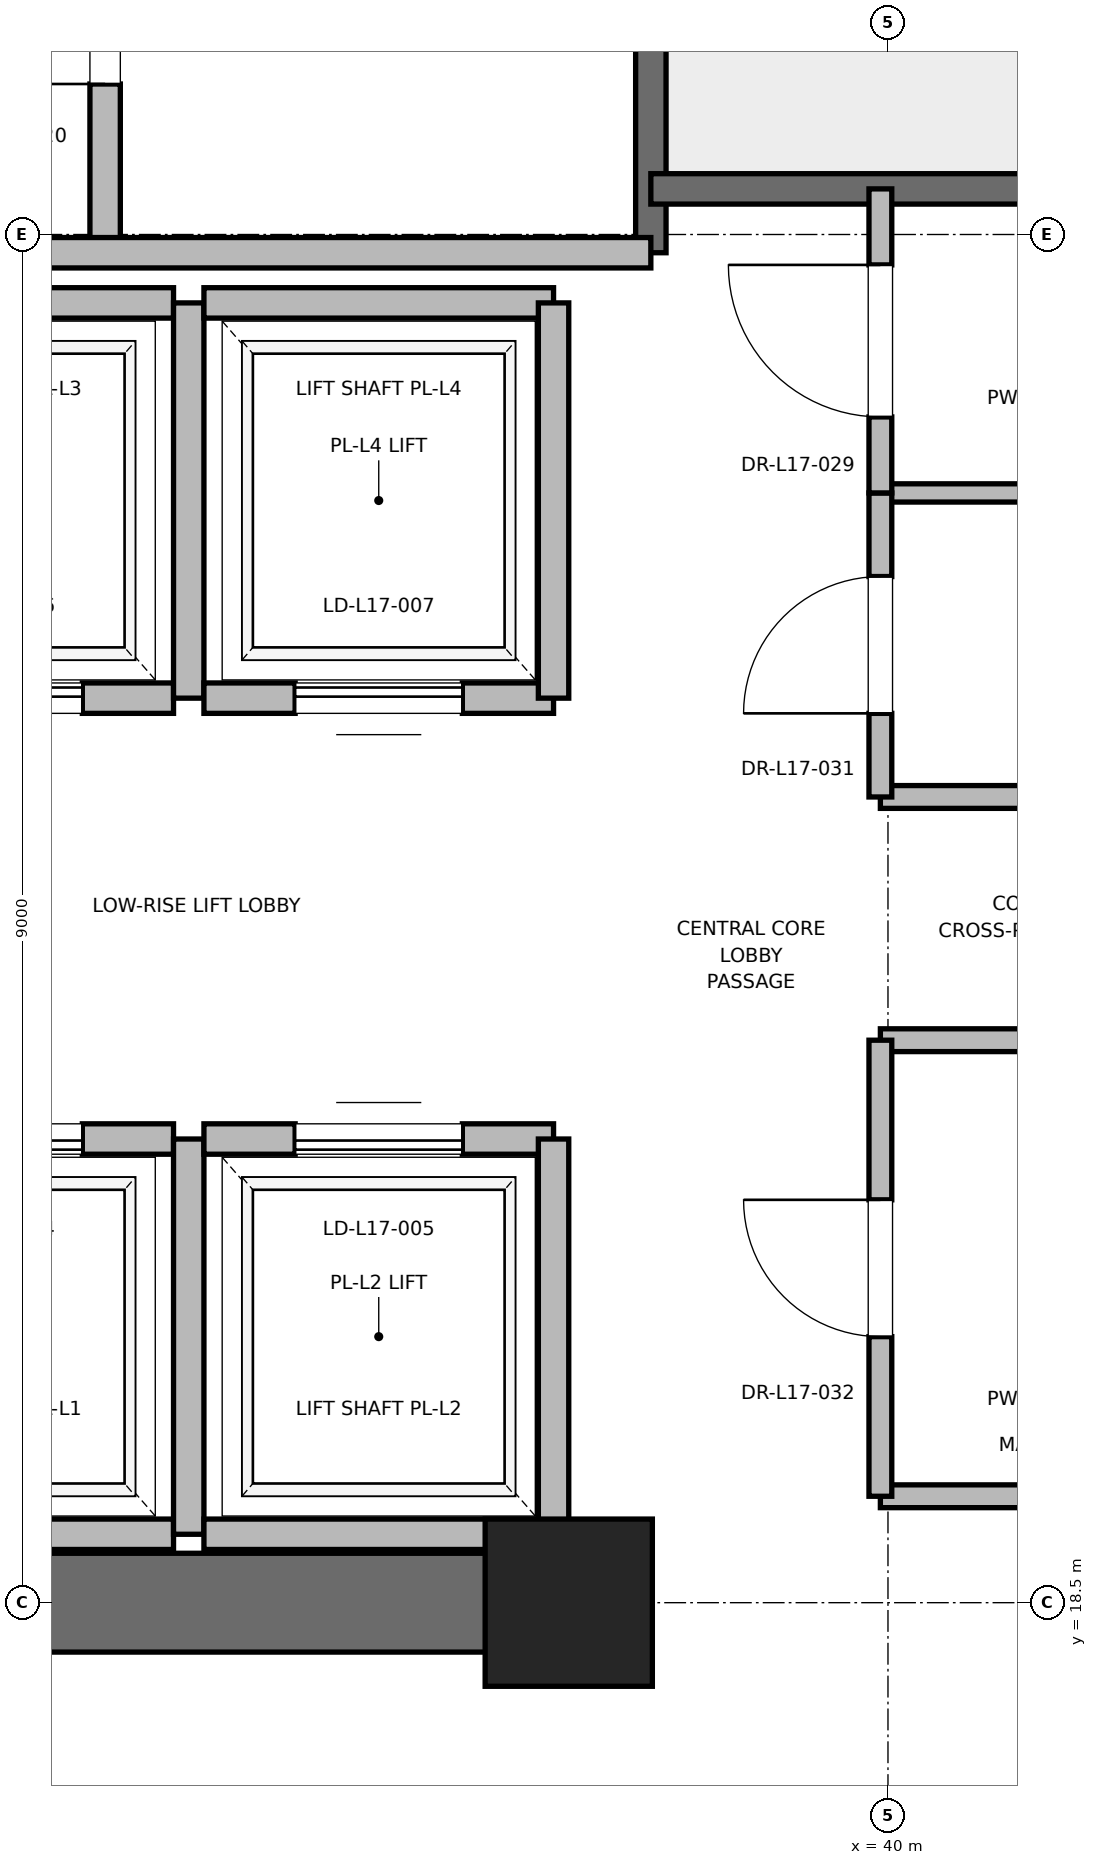
"""IFC4 building model, lengths in metres.
Left out: names, types, materials, properties, quantities, classifications, styles, units other than length and angle.
Written with IfcOpenShell. Run it as: python <this file> out.ifc"""

import sys

from ifc_helpers import new_model, si_unit, direction, frame, frame_2d, origin, origin_2d, place, context, subcontext, project, spatial, rectangle, extrude, element, fill, save


model = new_model("IFC4")
c1 = context("Model", 3, precision=1e-05, world=origin(), true_north=direction((0.0, 1.0)))
c2 = subcontext(c1, "Body", "Model", "MODEL_VIEW")
j1 = project(units=[si_unit("LENGTHUNIT", "METRE"), si_unit("PLANEANGLEUNIT", "RADIAN")], contexts=[c1])
p1 = place(None, origin())
s1 = spatial("IfcSite", under=j1, at=p1, CompositionType="ELEMENT")
p2 = place(p1, origin())
s2 = spatial("IfcBuilding", under=s1, at=p2, CompositionType="ELEMENT")
p3 = place(p2, frame((0.0, 0.0, 75.6)))
s3 = spatial("IfcBuildingStorey", under=s2, at=p3, CompositionType="ELEMENT", Elevation=75.6)
p4 = place(p3, frame((37.9, 18.5, 0.0), z_axis=(0.0, 0.0, 1.0), x_axis=(1.0, 0.0, 0.0)))
e1 = element("IfcColumn", 1, at=p4, inside=s3, PredefinedType="PILASTER", context=c2, shape_type="SweptSolid", body=[
    extrude(rectangle(XDim=1.1, YDim=1.1, at=origin_2d()), origin(), (0.0, 0.0, 1.0), 4.0),
])
p5 = place(p3, frame((29.0, 18.5, 0.0), z_axis=(0.0, 0.0, 1.0), x_axis=(1.0, 0.0, 0.0)))
e2 = element("IfcWall", 2, at=p5, inside=s3, PredefinedType="SHEAR", context=c2, shape_type="SweptSolid", body=[
    extrude(rectangle(XDim=9.2, YDim=0.65, at=frame_2d((4.6, 0.0))), origin(), (0.0, 0.0, 1.0), 3.76),
])
p6 = place(p3, frame((38.44, 27.38, 0.0), z_axis=(0.0, 0.0, 1.0), x_axis=(0.0, 1.0, 0.0)))
e3 = element("IfcWall", 3, at=p6, inside=s3, PredefinedType="SOLIDWALL", context=c2, shape_type="SweptSolid", body=[
    extrude(rectangle(XDim=8.87, YDim=0.2, at=frame_2d((4.435, 0.0))), origin(), (0.0, 0.0, 1.0), 3.76),
])
p7 = place(p3, frame((38.44, 27.8, 0.0), z_axis=(0.0, 0.0, 1.0), x_axis=(1.0, 0.0, 0.0)))
e4 = element("IfcWall", 4, at=p7, inside=s3, PredefinedType="SOLIDWALL", context=c2, shape_type="SweptSolid", body=[
    extrude(rectangle(XDim=3.32, YDim=0.2, at=frame_2d((1.66, 0.0))), origin(), (0.0, 0.0, 1.0), 3.76),
])
p8 = place(p3, frame((34.85, 27.38, 0.0), z_axis=(0.0, 0.0, 1.0), x_axis=(0.0, 1.0, 0.0)))
e5 = element("IfcWall", 5, at=p8, inside=s3, PredefinedType="PARTITIONING", context=c2, shape_type="SweptSolid", body=[
    extrude(rectangle(XDim=3.37, YDim=0.2, at=frame_2d((1.685, 0.0))), origin(), (0.0, 0.0, 1.0), 3.76),
])
p9 = place(p8, frame((1.11, 0.0, 0.0)))
e6 = element("IfcOpeningElement", 6, at=p9, cuts=e5, PredefinedType="OPENING", context=c2, shape_type="SweptSolid", body=[
    extrude(rectangle(XDim=1.15, YDim=2.2, at=frame_2d((0.575, 1.1))), frame((0.0, 0.1, 0.0), z_axis=(0.0, -1.0, 0.0), x_axis=(1.0, 0.0, 0.0)), (0.0, 0.0, 1.0), 0.2),
])
p10 = place(p3, frame((32.82, 27.38, 0.0), z_axis=(0.0, 0.0, 1.0), x_axis=(1.0, 0.0, 0.0)))
e7 = element("IfcWall", 7, at=p10, inside=s3, PredefinedType="PARTITIONING", context=c2, shape_type="SweptSolid", body=[
    extrude(rectangle(XDim=5.62, YDim=0.2, at=frame_2d((2.81, 0.0))), origin(), (0.0, 0.0, 1.0), 3.76),
])
p11 = place(p3, frame((33.0, 18.95, 0.0), z_axis=(0.0, 0.0, 1.0), x_axis=(1.0, 0.0, 0.0)))
e8 = element("IfcWall", 8, at=p11, inside=s3, PredefinedType="SOLIDWALL", context=c2, shape_type="SweptSolid", body=[
    extrude(rectangle(XDim=2.3, YDim=0.2, at=frame_2d((1.15, 0.0))), origin(), (0.0, 0.0, 1.0), 3.76),
])
p12 = place(p3, frame((35.3, 21.55, 0.0), z_axis=(0.0, 0.0, 1.0), x_axis=(-1.0, 0.0, 0.0)))
e9 = element("IfcWall", 9, at=p12, inside=s3, PredefinedType="SOLIDWALL", context=c2, shape_type="SweptSolid", body=[
    extrude(rectangle(XDim=2.3, YDim=0.2, at=frame_2d((1.15, 0.0))), origin(), (0.0, 0.0, 1.0), 3.76),
])
p13 = place(p12, frame((0.6, 0.0, 0.0)))
e10 = element("IfcOpeningElement", 10, at=p13, cuts=e9, PredefinedType="OPENING", context=c2, shape_type="SweptSolid", body=[
    extrude(rectangle(XDim=1.1, YDim=2.2, at=frame_2d((0.55, 1.1))), frame((0.0, 0.1, 0.0), z_axis=(0.0, -1.0, 0.0), x_axis=(1.0, 0.0, 0.0)), (0.0, 0.0, 1.0), 0.2),
])
p14 = place(p3, frame((35.4, 18.95, 0.0), z_axis=(0.0, 0.0, 1.0), x_axis=(0.0, 1.0, 0.0)))
e11 = element("IfcWall", 11, at=p14, inside=s3, PredefinedType="SOLIDWALL", context=c2, shape_type="SweptSolid", body=[
    extrude(rectangle(XDim=2.6, YDim=0.2, at=frame_2d((1.3, 0.0))), origin(), (0.0, 0.0, 1.0), 3.76),
])
p15 = place(p3, frame((35.5, 18.95, 0.0), z_axis=(0.0, 0.0, 1.0), x_axis=(1.0, 0.0, 0.0)))
e12 = element("IfcWall", 12, at=p15, inside=s3, PredefinedType="SOLIDWALL", context=c2, shape_type="SweptSolid", body=[
    extrude(rectangle(XDim=2.3, YDim=0.2, at=frame_2d((1.15, 0.0))), origin(), (0.0, 0.0, 1.0), 2.54),
])
p16 = place(p3, frame((37.8, 21.55, 0.0), z_axis=(0.0, 0.0, 1.0), x_axis=(-1.0, 0.0, 0.0)))
e13 = element("IfcWall", 13, at=p16, inside=s3, PredefinedType="SOLIDWALL", context=c2, shape_type="SweptSolid", body=[
    extrude(rectangle(XDim=2.3, YDim=0.2, at=frame_2d((1.15, 0.0))), origin(), (0.0, 0.0, 1.0), 3.76),
])
p17 = place(p16, frame((0.6, 0.0, 0.0)))
e14 = element("IfcOpeningElement", 14, at=p17, cuts=e13, PredefinedType="OPENING", context=c2, shape_type="SweptSolid", body=[
    extrude(rectangle(XDim=1.1, YDim=2.2, at=frame_2d((0.55, 1.1))), frame((0.0, 0.1, 0.0), z_axis=(0.0, -1.0, 0.0), x_axis=(1.0, 0.0, 0.0)), (0.0, 0.0, 1.0), 0.2),
])
p18 = place(p3, frame((37.8, 18.95, 0.0), z_axis=(0.0, 0.0, 1.0), x_axis=(0.0, 1.0, 0.0)))
e15 = element("IfcWall", 15, at=p18, inside=s3, PredefinedType="SOLIDWALL", context=c2, shape_type="SweptSolid", body=[
    extrude(rectangle(XDim=2.6, YDim=0.2, at=frame_2d((1.3, 0.0))), origin(), (0.0, 0.0, 1.0), 2.54),
])
p19 = place(p3, frame((33.0, 24.45, 0.0), z_axis=(0.0, 0.0, 1.0), x_axis=(1.0, 0.0, 0.0)))
e16 = element("IfcWall", 16, at=p19, inside=s3, PredefinedType="SOLIDWALL", context=c2, shape_type="SweptSolid", body=[
    extrude(rectangle(XDim=2.3, YDim=0.2, at=frame_2d((1.15, 0.0))), origin(), (0.0, 0.0, 1.0), 3.76),
])
p20 = place(p19, frame((0.6, 0.0, 0.0)))
e17 = element("IfcOpeningElement", 17, at=p20, cuts=e16, PredefinedType="OPENING", context=c2, shape_type="SweptSolid", body=[
    extrude(rectangle(XDim=1.1, YDim=2.2, at=frame_2d((0.55, 1.1))), frame((0.0, 0.1, 0.0), z_axis=(0.0, -1.0, 0.0), x_axis=(1.0, 0.0, 0.0)), (0.0, 0.0, 1.0), 0.2),
])
p21 = place(p3, frame((35.3, 27.05, 0.0), z_axis=(0.0, 0.0, 1.0), x_axis=(-1.0, 0.0, 0.0)))
e18 = element("IfcWall", 18, at=p21, inside=s3, PredefinedType="SOLIDWALL", context=c2, shape_type="SweptSolid", body=[
    extrude(rectangle(XDim=2.3, YDim=0.2, at=frame_2d((1.15, 0.0))), origin(), (0.0, 0.0, 1.0), 3.76),
])
p22 = place(p3, frame((35.4, 24.45, 0.0), z_axis=(0.0, 0.0, 1.0), x_axis=(0.0, 1.0, 0.0)))
e19 = element("IfcWall", 19, at=p22, inside=s3, PredefinedType="SOLIDWALL", context=c2, shape_type="SweptSolid", body=[
    extrude(rectangle(XDim=2.6, YDim=0.2, at=frame_2d((1.3, 0.0))), origin(), (0.0, 0.0, 1.0), 3.76),
])
p23 = place(p3, frame((35.5, 24.45, 0.0), z_axis=(0.0, 0.0, 1.0), x_axis=(1.0, 0.0, 0.0)))
e20 = element("IfcWall", 20, at=p23, inside=s3, PredefinedType="SOLIDWALL", context=c2, shape_type="SweptSolid", body=[
    extrude(rectangle(XDim=2.3, YDim=0.2, at=frame_2d((1.15, 0.0))), origin(), (0.0, 0.0, 1.0), 3.76),
])
p24 = place(p23, frame((0.6, 0.0, 0.0)))
e21 = element("IfcOpeningElement", 21, at=p24, cuts=e20, PredefinedType="OPENING", context=c2, shape_type="SweptSolid", body=[
    extrude(rectangle(XDim=1.1, YDim=2.2, at=frame_2d((0.55, 1.1))), frame((0.0, 0.1, 0.0), z_axis=(0.0, -1.0, 0.0), x_axis=(1.0, 0.0, 0.0)), (0.0, 0.0, 1.0), 0.2),
])
p25 = place(p3, frame((37.8, 27.05, 0.0), z_axis=(0.0, 0.0, 1.0), x_axis=(-1.0, 0.0, 0.0)))
e22 = element("IfcWall", 22, at=p25, inside=s3, PredefinedType="SOLIDWALL", context=c2, shape_type="SweptSolid", body=[
    extrude(rectangle(XDim=2.3, YDim=0.2, at=frame_2d((1.15, 0.0))), origin(), (0.0, 0.0, 1.0), 3.76),
])
p26 = place(p3, frame((37.8, 24.45, 0.0), z_axis=(0.0, 0.0, 1.0), x_axis=(0.0, 1.0, 0.0)))
e23 = element("IfcWall", 23, at=p26, inside=s3, PredefinedType="SOLIDWALL", context=c2, shape_type="SweptSolid", body=[
    extrude(rectangle(XDim=2.6, YDim=0.2, at=frame_2d((1.3, 0.0))), origin(), (0.0, 0.0, 1.0), 3.76),
])
for number, where, z_axis, x_axis in (
    (24, (39.95, 19.2, 0.0), (0.0, 0.0, 1.0), (1.0, 0.0, 0.0)),
    (25, (39.95, 22.2, 0.0), (0.0, 0.0, 1.0), (1.0, 0.0, 0.0)),
    (26, (39.95, 23.8, 0.0), (0.0, 0.0, 1.0), (1.0, 0.0, 0.0)),
):
    element("IfcWall", number, at=place(p3, frame(where, z_axis=z_axis, x_axis=x_axis)), inside=s3, PredefinedType="PARTITIONING", context=c2, shape_type="SweptSolid", body=[
        extrude(rectangle(XDim=1.81, YDim=0.15, at=frame_2d((0.905, 0.0))), origin(), (0.0, 0.0, 1.0), 2.85),
    ])
p27 = place(p3, frame((39.95, 25.8, 0.0), z_axis=(0.0, 0.0, 1.0), x_axis=(1.0, 0.0, 0.0)))
e27 = element("IfcWall", 27, at=p27, inside=s3, PredefinedType="PARTITIONING", context=c2, shape_type="SweptSolid", body=[
    extrude(rectangle(XDim=1.81, YDim=0.12, at=frame_2d((0.905, 0.0))), origin(), (0.0, 0.0, 1.0), 2.85),
])
p28 = place(p3, frame((39.95, 19.2, 0.0), z_axis=(0.0, 0.0, 1.0), x_axis=(0.0, 1.0, 0.0)))
e28 = element("IfcWall", 28, at=p28, inside=s3, PredefinedType="PARTITIONING", context=c2, shape_type="SweptSolid", body=[
    extrude(rectangle(XDim=3.0, YDim=0.15, at=frame_2d((1.5, 0.0))), origin(), (0.0, 0.0, 1.0), 2.85),
])
p29 = place(p28, frame((1.05, 0.0, 0.0)))
e29 = element("IfcOpeningElement", 29, at=p29, cuts=e28, PredefinedType="OPENING", context=c2, shape_type="SweptSolid", body=[
    extrude(rectangle(XDim=0.9, YDim=2.1, at=frame_2d((0.45, 1.05))), frame((0.0, 0.075, 0.0), z_axis=(0.0, -1.0, 0.0), x_axis=(1.0, 0.0, 0.0)), (0.0, 0.0, 1.0), 0.15),
])
p30 = place(p3, frame((39.95, 23.8, 0.0), z_axis=(0.0, 0.0, 1.0), x_axis=(0.0, 1.0, 0.0)))
e30 = element("IfcWall", 30, at=p30, inside=s3, PredefinedType="PARTITIONING", context=c2, shape_type="SweptSolid", body=[
    extrude(rectangle(XDim=2.0, YDim=0.15, at=frame_2d((1.0, 0.0))), origin(), (0.0, 0.0, 1.0), 2.85),
])
p31 = place(p30, frame((0.55, 0.0, 0.0)))
e31 = element("IfcOpeningElement", 31, at=p31, cuts=e30, PredefinedType="OPENING", context=c2, shape_type="SweptSolid", body=[
    extrude(rectangle(XDim=0.9, YDim=2.1, at=frame_2d((0.45, 1.05))), frame((0.0, 0.075, 0.0), z_axis=(0.0, -1.0, 0.0), x_axis=(1.0, 0.0, 0.0)), (0.0, 0.0, 1.0), 0.15),
])
p32 = place(p3, frame((39.95, 25.8, 0.0), z_axis=(0.0, 0.0, 1.0), x_axis=(0.0, 1.0, 0.0)))
e32 = element("IfcWall", 32, at=p32, inside=s3, PredefinedType="PARTITIONING", context=c2, shape_type="SweptSolid", body=[
    extrude(rectangle(XDim=2.0, YDim=0.15, at=frame_2d((1.0, 0.0))), origin(), (0.0, 0.0, 1.0), 2.85),
])
p33 = place(p32, frame((0.5, 0.0, 0.0)))
e33 = element("IfcOpeningElement", 33, at=p33, cuts=e32, PredefinedType="OPENING", context=c2, shape_type="SweptSolid", body=[
    extrude(rectangle(XDim=1.0, YDim=2.15, at=frame_2d((0.5, 1.075))), frame((0.0, 0.075, 0.0), z_axis=(0.0, -1.0, 0.0), x_axis=(1.0, 0.0, 0.0)), (0.0, 0.0, 1.0), 0.15),
])
p34 = place(p9, origin())
e34 = element("IfcDoor", 34, at=p34, inside=s3, OperationType="SINGLE_SWING_LEFT", PredefinedType="DOOR", context=c2, shape_type="SweptSolid", body=[
    extrude(rectangle(XDim=1.15, YDim=2.2, at=frame_2d((0.575, 1.1))), frame((0.0, 0.025, 0.0), z_axis=(0.0, -1.0, 0.0), x_axis=(1.0, 0.0, 0.0)), (0.0, 0.0, 1.0), 0.05),
])
fill(e6, e34)
p35 = place(p13, origin())
e35 = element("IfcDoor", 35, at=p35, inside=s3, OperationType="SLIDING_TO_RIGHT", PredefinedType="DOOR", context=c2, shape_type="SweptSolid", body=[
    extrude(rectangle(XDim=1.1, YDim=2.2, at=frame_2d((0.55, 1.1))), frame((0.0, 0.025, 0.0), z_axis=(0.0, -1.0, 0.0), x_axis=(1.0, 0.0, 0.0)), (0.0, 0.0, 1.0), 0.05),
])
fill(e10, e35)
p36 = place(p17, origin())
e36 = element("IfcDoor", 36, at=p36, inside=s3, OperationType="SLIDING_TO_RIGHT", PredefinedType="DOOR", context=c2, shape_type="SweptSolid", body=[
    extrude(rectangle(XDim=1.1, YDim=2.2, at=frame_2d((0.55, 1.1))), frame((0.0, 0.025, 0.0), z_axis=(0.0, -1.0, 0.0), x_axis=(1.0, 0.0, 0.0)), (0.0, 0.0, 1.0), 0.05),
])
fill(e14, e36)
p37 = place(p20, origin())
e37 = element("IfcDoor", 37, at=p37, inside=s3, OperationType="SLIDING_TO_RIGHT", PredefinedType="DOOR", context=c2, shape_type="SweptSolid", body=[
    extrude(rectangle(XDim=1.1, YDim=2.2, at=frame_2d((0.55, 1.1))), frame((0.0, 0.025, 0.0), z_axis=(0.0, -1.0, 0.0), x_axis=(1.0, 0.0, 0.0)), (0.0, 0.0, 1.0), 0.05),
])
fill(e17, e37)
p38 = place(p24, origin())
e38 = element("IfcDoor", 38, at=p38, inside=s3, OperationType="SLIDING_TO_RIGHT", PredefinedType="DOOR", context=c2, shape_type="SweptSolid", body=[
    extrude(rectangle(XDim=1.1, YDim=2.2, at=frame_2d((0.55, 1.1))), frame((0.0, 0.025, 0.0), z_axis=(0.0, -1.0, 0.0), x_axis=(1.0, 0.0, 0.0)), (0.0, 0.0, 1.0), 0.05),
])
fill(e21, e38)
p39 = place(p29, origin())
e39 = element("IfcDoor", 39, at=p39, inside=s3, OperationType="SINGLE_SWING_RIGHT", PredefinedType="DOOR", context=c2, shape_type="SweptSolid", body=[
    extrude(rectangle(XDim=0.9, YDim=2.1, at=frame_2d((0.45, 1.05))), frame((0.0, 0.025, 0.0), z_axis=(0.0, -1.0, 0.0), x_axis=(1.0, 0.0, 0.0)), (0.0, 0.0, 1.0), 0.05),
])
fill(e29, e39)
p40 = place(p31, origin())
e40 = element("IfcDoor", 40, at=p40, inside=s3, OperationType="SINGLE_SWING_LEFT", PredefinedType="DOOR", context=c2, shape_type="SweptSolid", body=[
    extrude(rectangle(XDim=0.9, YDim=2.1, at=frame_2d((0.45, 1.05))), frame((0.0, 0.025, 0.0), z_axis=(0.0, -1.0, 0.0), x_axis=(1.0, 0.0, 0.0)), (0.0, 0.0, 1.0), 0.05),
])
fill(e31, e40)
p41 = place(p33, origin())
e41 = element("IfcDoor", 41, at=p41, inside=s3, OperationType="SINGLE_SWING_RIGHT", PredefinedType="DOOR", context=c2, shape_type="SweptSolid", body=[
    extrude(rectangle(XDim=1.0, YDim=2.15, at=frame_2d((0.5, 1.075))), frame((0.0, 0.025, 0.0), z_axis=(0.0, -1.0, 0.0), x_axis=(1.0, 0.0, 0.0)), (0.0, 0.0, 1.0), 0.05),
])
fill(e33, e41)
save(model, sys.argv[1])
